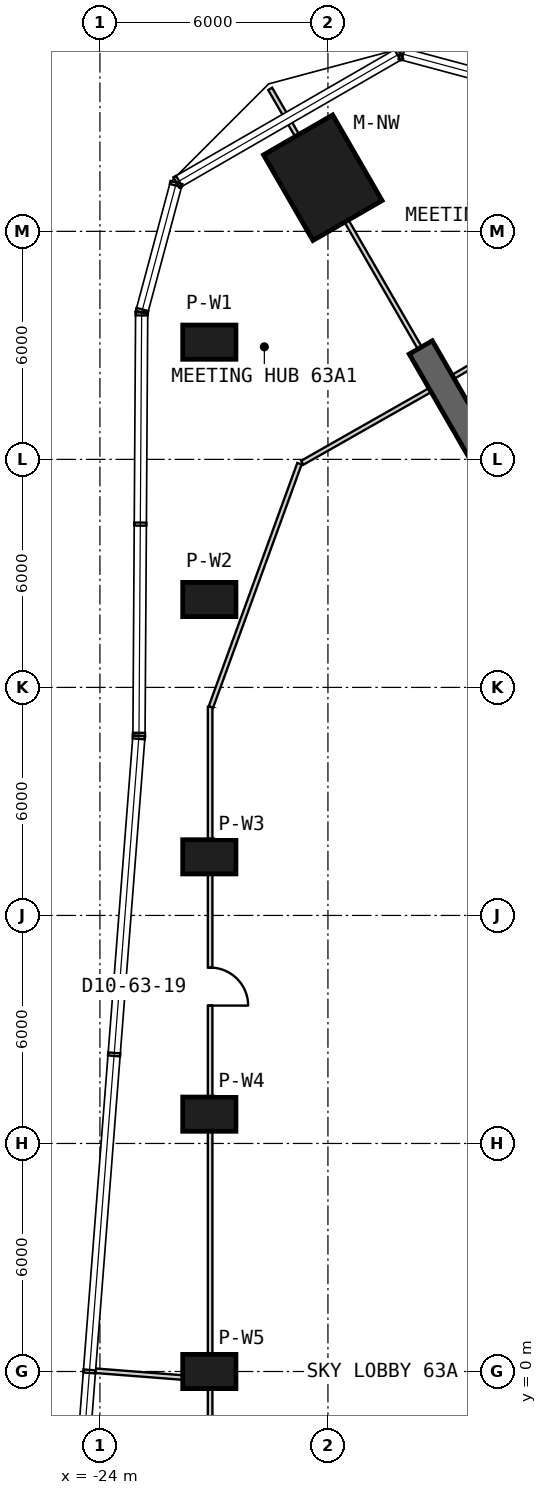
"""IFC4 building model, lengths in metres.
Left out: names, types, materials, properties, quantities, classifications, styles, units other than length and angle.
Written with IfcOpenShell. Run it as: python <this file> out.ifc"""

import sys

from ifc_helpers import new_model, si_unit, direction, frame, frame_2d, origin, origin_2d, place, context, subcontext, project, spatial, rectangle, extrude, element, fill, save


model = new_model("IFC4")
c1 = context("Model", 3, precision=1e-05, world=origin(), true_north=direction((0.0, 1.0)))
c2 = subcontext(c1, "Body", "Model", "MODEL_VIEW")
j1 = project(units=[si_unit("LENGTHUNIT", "METRE"), si_unit("PLANEANGLEUNIT", "RADIAN")], contexts=[c1])
p1 = place(None, origin())
s1 = spatial("IfcSite", under=j1, at=p1, CompositionType="ELEMENT")
p2 = place(p1, origin())
s2 = spatial("IfcBuilding", under=s1, at=p2, CompositionType="ELEMENT")
p3 = place(p2, frame((0.0, 0.0, 277.2)))
s3 = spatial("IfcBuildingStorey", under=s2, at=p3, CompositionType="ELEMENT", Elevation=277.2)
p4 = place(p3, frame((-18.135, 31.411, 0.0), z_axis=(0.0, 0.0, 1.0), x_axis=(-0.5, 0.866025403784, 0.0)))
e1 = element("IfcColumn", 1, at=p4, inside=s3, PredefinedType="COLUMN", context=c2, shape_type="SweptSolid", body=[
    extrude(rectangle(XDim=2.6, YDim=2.1, at=origin_2d()), origin(), (0.0, 0.0, 1.0), 6.5),
])
for number, where, z_axis, x_axis in (
    (2, (-21.121, 27.084, 0.0), (0.0, 0.0, 1.0), (-1.0, 0.0, 0.0)),
    (3, (-21.121, 20.313, 0.0), (0.0, 0.0, 1.0), (-1.0, 0.0, 0.0)),
    (4, (-21.121, 13.542, 0.0), (0.0, 0.0, 1.0), (-1.0, 0.0, 0.0)),
    (5, (-21.121, 6.771, 0.0), (0.0, 0.0, 1.0), (-1.0, 0.0, 0.0)),
    (6, (-21.121, 0.0, 0.0), (0.0, 0.0, 1.0), (-1.0, 0.0, 0.0)),
):
    element("IfcColumn", number, at=place(p3, frame(where, z_axis=z_axis, x_axis=x_axis)), inside=s3, PredefinedType="COLUMN", context=c2, shape_type="SweptSolid", body=[
        extrude(rectangle(XDim=1.4, YDim=0.9, at=origin_2d()), origin(), (0.0, 0.0, 1.0), 6.5),
    ])
p5 = place(p3, frame((-10.575, 18.316, 0.0), z_axis=(0.0, 0.0, 1.0), x_axis=(-0.500007350791, 0.866021159762, 0.0)))
e7 = element("IfcWall", 7, at=p5, inside=s3, PredefinedType="SHEAR", context=c2, shape_type="SweptSolid", body=[
    extrude(rectangle(XDim=9.965, YDim=0.7, at=frame_2d((4.982, 0.0))), origin(), (0.0, 0.0, 1.0), 6.5),
])
p6 = place(p5, frame((2.05, 0.0, 0.0)))
e8 = element("IfcOpeningElement", 8, at=p6, cuts=e7, PredefinedType="OPENING", context=c2, shape_type="SweptSolid", body=[
    extrude(rectangle(XDim=1.4, YDim=2.4, at=frame_2d((0.7, 1.2))), frame((0.0, 0.36, 0.0), z_axis=(0.0, -1.0, 0.0), x_axis=(1.0, 0.0, 0.0)), (0.0, 0.0, 1.0), 0.72),
])
p7 = place(p3, frame((-21.1, 17.488, 0.0), z_axis=(0.0, 0.0, 1.0), x_axis=(0.0, -1.0, 0.0)))
e9 = element("IfcWall", 9, at=p7, inside=s3, PredefinedType="PARTITIONING", context=c2, shape_type="SweptSolid", body=[
    extrude(rectangle(XDim=17.706, YDim=0.12, at=frame_2d((8.853, 0.0))), origin(), (0.0, 0.0, 1.0), 6.1),
])
p8 = place(p7, frame((6.86, 0.0, 0.0)))
e10 = element("IfcOpeningElement", 10, at=p8, cuts=e9, PredefinedType="OPENING", context=c2, shape_type="SweptSolid", body=[
    extrude(rectangle(XDim=1.0, YDim=2.1, at=frame_2d((0.5, 1.05))), frame((0.0, 0.07, 0.0), z_axis=(0.0, -1.0, 0.0), x_axis=(1.0, 0.0, 0.0)), (0.0, 0.0, 1.0), 0.14),
])
p9 = place(p3, frame((-21.1, -0.218, 0.0), z_axis=(0.0, 0.0, 1.0), x_axis=(0.0, -1.0, 0.0)))
e11 = element("IfcWall", 11, at=p9, inside=s3, PredefinedType="PARTITIONING", context=c2, shape_type="SweptSolid", body=[
    extrude(rectangle(XDim=17.15, YDim=0.12, at=frame_2d((8.575, 0.0))), origin(), (0.0, 0.0, 1.0), 6.1),
])
p10 = place(p9, frame((9.0, 0.0, 0.0)))
e12 = element("IfcOpeningElement", 12, at=p10, cuts=e11, PredefinedType="OPENING", context=c2, shape_type="SweptSolid", body=[
    extrude(rectangle(XDim=1.8, YDim=2.1, at=frame_2d((0.9, 1.05))), frame((0.0, 0.07, 0.0), z_axis=(0.0, -1.0, 0.0), x_axis=(1.0, 0.0, 0.0)), (0.0, 0.0, 1.0), 0.14),
])
p11 = place(p3, frame((-18.75, 23.886, 0.0), z_axis=(0.0, 0.0, 1.0), x_axis=(-0.342042310023, -0.939684552472, 0.0)))
e13 = element("IfcWall", 13, at=p11, inside=s3, PredefinedType="PARTITIONING", context=c2, shape_type="SweptSolid", body=[
    extrude(rectangle(XDim=6.812, YDim=0.12, at=frame_2d((3.406, 0.0))), origin(), (0.0, 0.0, 1.0), 5.28),
])
p12 = place(p3, frame((-15.312, 25.822, 0.0), z_axis=(0.0, 0.0, 1.0), x_axis=(-0.869455941421, -0.494010491718, 0.0)))
e14 = element("IfcWall", 14, at=p12, inside=s3, PredefinedType="PARTITIONING", context=c2, shape_type="SweptSolid", body=[
    extrude(rectangle(XDim=3.869, YDim=0.12, at=frame_2d((1.935, 0.0))), origin(), (0.0, 0.0, 1.0), 5.28),
])
p13 = place(p3, frame((-21.16, -0.21, 0.0), z_axis=(0.0, 0.0, 1.0), x_axis=(-0.996976257669, 0.077706767045, 0.0)))
e15 = element("IfcWall", 15, at=p13, inside=s3, PredefinedType="PARTITIONING", context=c2, shape_type="SweptSolid", body=[
    extrude(rectangle(XDim=3.123, YDim=0.12, at=frame_2d((1.562, 0.0))), origin(), (0.0, 0.0, 1.0), 6.1),
])
p14 = place(p3, frame((-19.52, 33.75, 0.0), z_axis=(0.0, 0.0, 1.0), x_axis=(0.50006528296, -0.865987709369, 0.0)))
e16 = element("IfcWall", 16, at=p14, inside=s3, PredefinedType="PARTITIONING", context=c2, shape_type="SweptSolid", body=[
    extrude(rectangle(XDim=1.418, YDim=0.12, at=frame_2d((0.709, 0.0))), origin(), (0.0, 0.0, 1.0), 6.1),
])
p15 = place(p3, frame((-17.511, 30.27, 0.0), z_axis=(0.0, 0.0, 1.0), x_axis=(0.499980071345, -0.866036909293, 0.0)))
e17 = element("IfcWall", 17, at=p15, inside=s3, PredefinedType="PARTITIONING", context=c2, shape_type="SweptSolid", body=[
    extrude(rectangle(XDim=3.856, YDim=0.12, at=frame_2d((1.928, 0.0))), origin(), (0.0, 0.0, 1.0), 5.67),
])
p16 = place(p3, frame((-11.27, 28.188, 0.0), z_axis=(0.0, 0.0, 1.0), x_axis=(-0.862533821039, -0.505999414588, 0.0)))
e18 = element("IfcWall", 18, at=p16, inside=s3, PredefinedType="PARTITIONING", context=c2, shape_type="SweptSolid", body=[
    extrude(rectangle(XDim=3.984, YDim=0.12, at=frame_2d((1.992, 0.0))), origin(), (0.0, 0.0, 1.0), 5.28),
])
p17 = place(p8, origin())
e19 = element("IfcDoor", 19, at=p17, inside=s3, OperationType="SINGLE_SWING_RIGHT", PredefinedType="NOTDEFINED", context=c2, shape_type="SweptSolid", body=[
    extrude(rectangle(XDim=1.0, YDim=2.1, at=frame_2d((0.5, 1.05))), frame((0.0, 0.025, 0.0), z_axis=(0.0, -1.0, 0.0), x_axis=(1.0, 0.0, 0.0)), (0.0, 0.0, 1.0), 0.05),
])
fill(e10, e19)
save(model, sys.argv[1])
